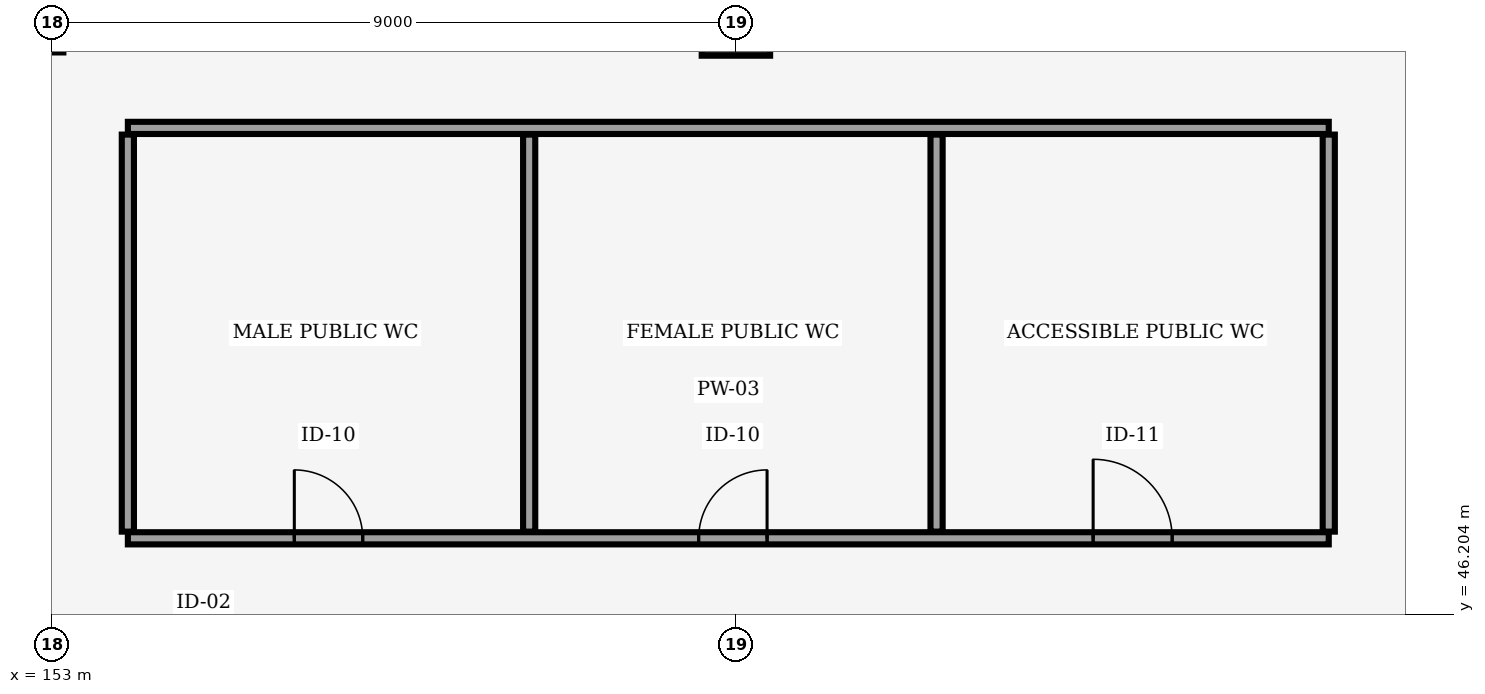
"""IFC4 building model, lengths in metres.
Left out: names, types, materials, properties, quantities, classifications, styles, units other than length and angle.
Written with IfcOpenShell. Run it as: python <this file> out.ifc"""

import sys

from ifc_helpers import new_model, si_unit, direction, frame, frame_2d, origin, origin_2d, place, context, subcontext, project, spatial, rectangle, i_section, extrude, element, fill, save


model = new_model("IFC4")
c1 = context("Model", 3, precision=1e-05, world=origin(), true_north=direction((0.0, 1.0)))
c2 = subcontext(c1, "Body", "Model", "MODEL_VIEW")
j1 = project(units=[si_unit("LENGTHUNIT", "METRE"), si_unit("PLANEANGLEUNIT", "RADIAN")], contexts=[c1])
p1 = place(None, origin())
s1 = spatial("IfcSite", under=j1, at=p1, CompositionType="ELEMENT")
p2 = place(p1, origin())
s2 = spatial("IfcBuilding", under=s1, at=p2, CompositionType="ELEMENT")
p3 = place(p2, origin())
s3 = spatial("IfcBuildingStorey", under=s2, at=p3, CompositionType="ELEMENT", Elevation=0.0)
p4 = place(p3, frame((153.0, 54.0, 0.0), z_axis=(0.0, 0.0, 1.0), x_axis=(1.0, 0.0, 0.0)))
e1 = element("IfcColumn", 1, at=p4, inside=s3, PredefinedType="COLUMN", context=c2, shape_type="SweptSolid", body=[
    extrude(i_section(OverallWidth=0.303, OverallDepth=0.814, WebThickness=0.021, FlangeThickness=0.04, FilletRadius=0.03, at=origin_2d()), origin(), (0.0, 0.0, 1.0), 6.0),
])
p5 = place(p3, frame((162.0, 54.0, 0.0), z_axis=(0.0, 0.0, 1.0), x_axis=(1.0, 0.0, 0.0)))
e2 = element("IfcColumn", 2, at=p5, inside=s3, PredefinedType="COLUMN", context=c2, shape_type="SweptSolid", body=[
    extrude(rectangle(XDim=0.9, YDim=0.9, at=origin_2d()), origin(), (0.0, 0.0, 1.0), 6.0),
])
p6 = place(p3, frame((154.0, 47.2, 0.0), z_axis=(0.0, 0.0, 1.0), x_axis=(1.0, 0.0, 0.0)))
e3 = element("IfcWall", 3, at=p6, inside=s3, PredefinedType="PLUMBINGWALL", context=c2, shape_type="SweptSolid", body=[
    extrude(rectangle(XDim=15.8, YDim=0.16, at=frame_2d((7.9, 0.0))), origin(), (0.0, 0.0, 1.0), 4.85),
])
p7 = place(p6, frame((2.19, 0.0, 0.0)))
e4 = element("IfcOpeningElement", 4, at=p7, cuts=e3, PredefinedType="OPENING", context=c2, shape_type="SweptSolid", body=[
    extrude(rectangle(XDim=0.9, YDim=2.1, at=frame_2d((0.45, 1.05))), frame((0.0, 0.09, 0.0), z_axis=(0.0, -1.0, 0.0), x_axis=(1.0, 0.0, 0.0)), (0.0, 0.0, 1.0), 0.18),
])
p8 = place(p6, frame((7.51, 0.0, 0.0)))
e5 = element("IfcOpeningElement", 5, at=p8, cuts=e3, PredefinedType="OPENING", context=c2, shape_type="SweptSolid", body=[
    extrude(rectangle(XDim=0.9, YDim=2.1, at=frame_2d((0.45, 1.05))), frame((0.0, 0.09, 0.0), z_axis=(0.0, -1.0, 0.0), x_axis=(1.0, 0.0, 0.0)), (0.0, 0.0, 1.0), 0.18),
])
p9 = place(p6, frame((12.7, 0.0, 0.0)))
e6 = element("IfcOpeningElement", 6, at=p9, cuts=e3, PredefinedType="OPENING", context=c2, shape_type="SweptSolid", body=[
    extrude(rectangle(XDim=1.04, YDim=2.15, at=frame_2d((0.52, 1.075))), frame((0.0, 0.09, 0.0), z_axis=(0.0, -1.0, 0.0), x_axis=(1.0, 0.0, 0.0)), (0.0, 0.0, 1.0), 0.18),
])
p10 = place(p3, frame((154.0, 52.6, 0.0), z_axis=(0.0, 0.0, 1.0), x_axis=(1.0, 0.0, 0.0)))
e7 = element("IfcWall", 7, at=p10, inside=s3, PredefinedType="PLUMBINGWALL", context=c2, shape_type="SweptSolid", body=[
    extrude(rectangle(XDim=15.8, YDim=0.16, at=frame_2d((7.9, 0.0))), origin(), (0.0, 0.0, 1.0), 4.85),
])
for number, where, z_axis, x_axis in (
    (8, (154.0, 47.288, 0.0), (0.0, 0.0, 1.0), (0.0, 1.0, 0.0)),
    (9, (159.28, 47.288, 0.0), (0.0, 0.0, 1.0), (0.0, 1.0, 0.0)),
    (10, (164.64, 47.288, 0.0), (0.0, 0.0, 1.0), (0.0, 1.0, 0.0)),
    (11, (169.8, 47.288, 0.0), (0.0, 0.0, 1.0), (0.0, 1.0, 0.0)),
):
    element("IfcWall", number, at=place(p3, frame(where, z_axis=z_axis, x_axis=x_axis)), inside=s3, PredefinedType="PLUMBINGWALL", context=c2, shape_type="SweptSolid", body=[
        extrude(rectangle(XDim=5.224, YDim=0.16, at=frame_2d((2.612, 0.0))), origin(), (0.0, 0.0, 1.0), 4.85),
    ])
p11 = place(p7, origin())
e12 = element("IfcDoor", 12, at=p11, inside=s3, OperationType="SINGLE_SWING_LEFT", PredefinedType="DOOR", context=c2, shape_type="SweptSolid", body=[
    extrude(rectangle(XDim=0.9, YDim=2.1, at=frame_2d((0.45, 1.05))), frame((0.0, 0.025, 0.0), z_axis=(0.0, -1.0, 0.0), x_axis=(1.0, 0.0, 0.0)), (0.0, 0.0, 1.0), 0.05),
])
fill(e4, e12)
p12 = place(p8, origin())
e13 = element("IfcDoor", 13, at=p12, inside=s3, OperationType="SINGLE_SWING_RIGHT", PredefinedType="DOOR", context=c2, shape_type="SweptSolid", body=[
    extrude(rectangle(XDim=0.9, YDim=2.1, at=frame_2d((0.45, 1.05))), frame((0.0, 0.025, 0.0), z_axis=(0.0, -1.0, 0.0), x_axis=(1.0, 0.0, 0.0)), (0.0, 0.0, 1.0), 0.05),
])
fill(e5, e13)
p13 = place(p9, origin())
e14 = element("IfcDoor", 14, at=p13, inside=s3, OperationType="SINGLE_SWING_LEFT", PredefinedType="DOOR", context=c2, shape_type="SweptSolid", body=[
    extrude(rectangle(XDim=1.04, YDim=2.15, at=frame_2d((0.52, 1.075))), frame((0.0, 0.025, 0.0), z_axis=(0.0, -1.0, 0.0), x_axis=(1.0, 0.0, 0.0)), (0.0, 0.0, 1.0), 0.05),
])
fill(e6, e14)
save(model, sys.argv[1])
